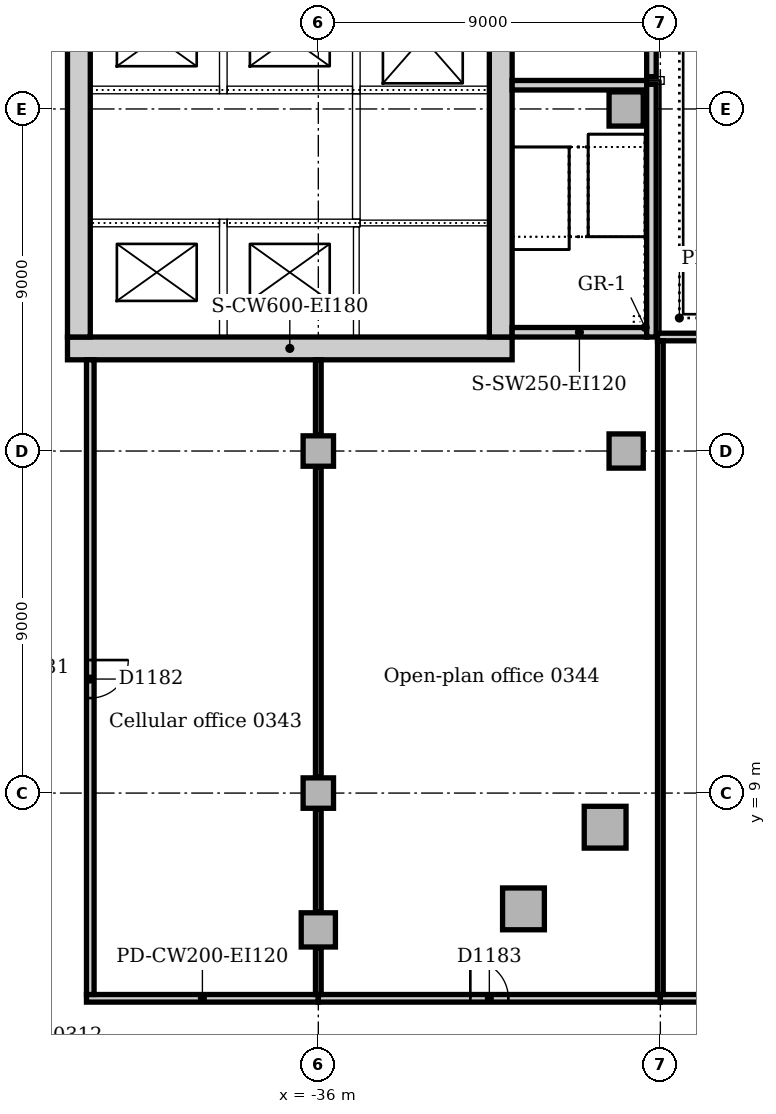
"""IFC4 building model, lengths in metres.
Left out: names, types, materials, properties, quantities, classifications, styles, units other than length and angle.
Written with IfcOpenShell. Run it as: python <this file> out.ifc"""

import sys

from ifc_helpers import new_model, si_unit, direction, frame, frame_2d, origin, origin_2d, place, context, subcontext, project, spatial, rectangle, extrude, element, fill, save


model = new_model("IFC4")
c1 = context("Model", 3, precision=1e-05, world=origin(), true_north=direction((0.0, 1.0)))
c2 = subcontext(c1, "Body", "Model", "MODEL_VIEW")
j1 = project(units=[si_unit("LENGTHUNIT", "METRE"), si_unit("PLANEANGLEUNIT", "RADIAN")], contexts=[c1])
p1 = place(None, origin())
s1 = spatial("IfcSite", under=j1, at=p1, CompositionType="ELEMENT")
p2 = place(p1, origin())
s2 = spatial("IfcBuilding", under=s1, at=p2, CompositionType="ELEMENT")
p3 = place(p2, frame((0.0, 0.0, 16.0)))
s3 = spatial("IfcBuildingStorey", under=s2, at=p3, CompositionType="ELEMENT", Elevation=16.0)
p4 = place(p3, frame((-42.6, 20.7, 0.0), z_axis=(0.0, 0.0, 1.0), x_axis=(1.0, 0.0, 0.0)))
e1 = element("IfcWall", 1, at=p4, inside=s3, PredefinedType="SOLIDWALL", context=c2, shape_type="SweptSolid", body=[
    extrude(rectangle(XDim=11.7, YDim=0.6, at=frame_2d((5.85, 0.0))), origin(), (0.0, 0.0, 1.0), 5.0),
])
p5 = place(p3, frame((-31.2, 21.0, 0.0), z_axis=(0.0, 0.0, 1.0), x_axis=(0.0, 1.0, 0.0)))
e2 = element("IfcWall", 2, at=p5, inside=s3, PredefinedType="SOLIDWALL", context=c2, shape_type="SweptSolid", body=[
    extrude(rectangle(XDim=9.5, YDim=0.6, at=frame_2d((4.75, 0.0))), origin(), (0.0, 0.0, 1.0), 5.0),
])
p6 = place(p5, frame((5.25, 0.0, 0.0)))
e3 = element("IfcOpeningElement", 3, at=p6, cuts=e2, PredefinedType="OPENING", context=c2, shape_type="SweptSolid", body=[
    extrude(rectangle(XDim=1.0, YDim=2.1, at=frame_2d((0.5, 1.05))), frame((0.0, 0.31, 0.0), z_axis=(0.0, -1.0, 0.0), x_axis=(1.0, 0.0, 0.0)), (0.0, 0.0, 1.0), 0.62),
])
p7 = place(p3, frame((-42.3, 30.5, 0.0), z_axis=(0.0, 0.0, 1.0), x_axis=(0.0, -1.0, 0.0)))
e4 = element("IfcWall", 4, at=p7, inside=s3, PredefinedType="SOLIDWALL", context=c2, shape_type="SweptSolid", body=[
    extrude(rectangle(XDim=9.5, YDim=0.6, at=frame_2d((4.75, 0.0))), origin(), (0.0, 0.0, 1.0), 5.0),
])
p8 = place(p7, frame((3.85, 0.0, 0.0)))
e5 = element("IfcOpeningElement", 5, at=p8, cuts=e4, PredefinedType="OPENING", context=c2, shape_type="SweptSolid", body=[
    extrude(rectangle(XDim=1.8, YDim=2.1, at=frame_2d((0.9, 1.05))), frame((0.0, 0.31, 0.0), z_axis=(0.0, -1.0, 0.0), x_axis=(1.0, 0.0, 0.0)), (0.0, 0.0, 1.0), 0.62),
])
p9 = place(p3, frame((-30.9, 21.125, 0.0), z_axis=(0.0, 0.0, 1.0), x_axis=(1.0, 0.0, 0.0)))
e6 = element("IfcWall", 6, at=p9, inside=s3, PredefinedType="SOLIDWALL", context=c2, shape_type="SweptSolid", body=[
    extrude(rectangle(XDim=3.54, YDim=0.25, at=frame_2d((1.77, 0.0))), origin(), (0.0, 0.0, 1.0), 5.0),
])
p10 = place(p3, frame((-27.36, 27.625, 0.0), z_axis=(0.0, 0.0, 1.0), x_axis=(-1.0, 0.0, 0.0)))
e7 = element("IfcWall", 7, at=p10, inside=s3, PredefinedType="SOLIDWALL", context=c2, shape_type="SweptSolid", body=[
    extrude(rectangle(XDim=3.54, YDim=0.25, at=frame_2d((1.77, 0.0))), origin(), (0.0, 0.0, 1.0), 5.0),
])
p11 = place(p10, frame((1.69, 0.0, 0.0)))
e8 = element("IfcOpeningElement", 8, at=p11, cuts=e7, PredefinedType="OPENING", context=c2, shape_type="SweptSolid", body=[
    extrude(rectangle(XDim=1.1, YDim=2.1, at=frame_2d((0.55, 1.05))), frame((0.0, 0.135, 0.0), z_axis=(0.0, -1.0, 0.0), x_axis=(1.0, 0.0, 0.0)), (0.0, 0.0, 1.0), 0.27),
])
p12 = place(p3, frame((-27.235, 21.0, 0.0), z_axis=(0.0, 0.0, 1.0), x_axis=(0.0, 1.0, 0.0)))
e9 = element("IfcWall", 9, at=p12, inside=s3, PredefinedType="SOLIDWALL", context=c2, shape_type="SweptSolid", body=[
    extrude(rectangle(XDim=6.65, YDim=0.25, at=frame_2d((3.325, 0.0))), origin(), (0.0, 0.0, 1.0), 5.0),
])
p13 = place(p3, frame((-27.235, 27.85, 0.0), z_axis=(0.0, 0.0, 1.0), x_axis=(0.0, 1.0, 0.0)))
e10 = element("IfcWall", 10, at=p13, inside=s3, PredefinedType="SOLIDWALL", context=c2, shape_type="SweptSolid", body=[
    extrude(rectangle(XDim=7.3, YDim=0.25, at=frame_2d((3.65, 0.0))), origin(), (0.0, 0.0, 1.0), 5.0),
])
for number, where, z_axis, x_axis in (
    (11, (-30.602, 5.953, 0.0), (0.0, 0.0, 1.0), (1.0, 0.0, 0.0)),
    (12, (-28.453, 8.102, 0.0), (0.0, 0.0, 1.0), (1.0, 0.0, 0.0)),
):
    element("IfcColumn", number, at=place(p3, frame(where, z_axis=z_axis, x_axis=x_axis)), inside=s3, PredefinedType="COLUMN", context=c2, shape_type="SweptSolid", body=[
        extrude(rectangle(XDim=1.1, YDim=1.1, at=origin_2d()), origin(), (0.0, 0.0, 1.0), 4.7),
    ])
for number, where, z_axis, x_axis in (
    (13, (-36.0, 5.4, 0.0), (0.0, 0.0, 1.0), (1.0, 0.0, 0.0)),
    (14, (-27.9, 18.0, 0.0), (0.0, 0.0, 1.0), (1.0, 0.0, 0.0)),
):
    element("IfcColumn", number, at=place(p3, frame(where, z_axis=z_axis, x_axis=x_axis)), inside=s3, PredefinedType="COLUMN", context=c2, shape_type="SweptSolid", body=[
        extrude(rectangle(XDim=0.9, YDim=0.9, at=origin_2d()), origin(), (0.0, 0.0, 1.0), 4.7),
    ])
p14 = place(p3, frame((-27.9, 27.0, 0.0), z_axis=(0.0, 0.0, 1.0), x_axis=(1.0, 0.0, 0.0)))
e15 = element("IfcColumn", 15, at=p14, inside=s3, PredefinedType="COLUMN", context=c2, shape_type="SweptSolid", body=[
    extrude(rectangle(XDim=0.9, YDim=0.9, at=origin_2d()), origin(), (0.0, 0.0, 1.0), 5.0),
])
for number, where, z_axis, x_axis in (
    (16, (-36.0, 9.0, 0.0), (0.0, 0.0, 1.0), (1.0, 0.0, 0.0)),
    (17, (-36.0, 18.0, 0.0), (0.0, 0.0, 1.0), (1.0, 0.0, 0.0)),
):
    element("IfcColumn", number, at=place(p3, frame(where, z_axis=z_axis, x_axis=x_axis)), inside=s3, PredefinedType="COLUMN", context=c2, shape_type="SweptSolid", body=[
        extrude(rectangle(XDim=0.8, YDim=0.8, at=origin_2d()), origin(), (0.0, 0.0, 1.0), 4.7),
    ])
p15 = place(p3, frame((-42.1, 3.6, 0.0), z_axis=(0.0, 0.0, 1.0), x_axis=(1.0, 0.0, 0.0)))
e18 = element("IfcWall", 18, at=p15, inside=s3, PredefinedType="PARTITIONING", context=c2, shape_type="SweptSolid", body=[
    extrude(rectangle(XDim=6.1, YDim=0.2, at=frame_2d((3.05, 0.0))), origin(), (0.0, 0.0, 1.0), 4.7),
])
p16 = place(p3, frame((-36.0, 3.6, 0.0), z_axis=(0.0, 0.0, 1.0), x_axis=(1.0, 0.0, 0.0)))
e19 = element("IfcWall", 19, at=p16, inside=s3, PredefinedType="PARTITIONING", context=c2, shape_type="SweptSolid", body=[
    extrude(rectangle(XDim=9.0, YDim=0.2, at=frame_2d((4.5, 0.0))), origin(), (0.0, 0.0, 1.0), 4.7),
])
p17 = place(p16, frame((4.0, 0.0, 0.0)))
e20 = element("IfcOpeningElement", 20, at=p17, cuts=e19, PredefinedType="OPENING", context=c2, shape_type="SweptSolid", body=[
    extrude(rectangle(XDim=1.0, YDim=2.1, at=frame_2d((0.5, 1.05))), frame((0.0, 0.11, 0.0), z_axis=(0.0, -1.0, 0.0), x_axis=(1.0, 0.0, 0.0)), (0.0, 0.0, 1.0), 0.22),
])
p18 = place(p3, frame((-42.0, 3.7, 0.0), z_axis=(0.0, 0.0, 1.0), x_axis=(0.0, 1.0, 0.0)))
e21 = element("IfcWall", 21, at=p18, inside=s3, PredefinedType="PARTITIONING", context=c2, shape_type="SweptSolid", body=[
    extrude(rectangle(XDim=16.7, YDim=0.2, at=frame_2d((8.35, 0.0))), origin(), (0.0, 0.0, 1.0), 4.7),
])
p19 = place(p18, frame((7.8, 0.0, 0.0)))
e22 = element("IfcOpeningElement", 22, at=p19, cuts=e21, PredefinedType="OPENING", context=c2, shape_type="SweptSolid", body=[
    extrude(rectangle(XDim=1.0, YDim=2.1, at=frame_2d((0.5, 1.05))), frame((0.0, 0.11, 0.0), z_axis=(0.0, -1.0, 0.0), x_axis=(1.0, 0.0, 0.0)), (0.0, 0.0, 1.0), 0.22),
])
p20 = place(p3, frame((-27.0, 3.6, 0.0), z_axis=(0.0, 0.0, 1.0), x_axis=(1.0, 0.0, 0.0)))
e23 = element("IfcWall", 23, at=p20, inside=s3, PredefinedType="PARTITIONING", context=c2, shape_type="SweptSolid", body=[
    extrude(rectangle(XDim=9.0, YDim=0.2, at=frame_2d((4.5, 0.0))), origin(), (0.0, 0.0, 1.0), 4.7),
])
p21 = place(p20, frame((4.0, 0.0, 0.0)))
e24 = element("IfcOpeningElement", 24, at=p21, cuts=e23, PredefinedType="OPENING", context=c2, shape_type="SweptSolid", body=[
    extrude(rectangle(XDim=1.0, YDim=2.1, at=frame_2d((0.5, 1.05))), frame((0.0, 0.11, 0.0), z_axis=(0.0, -1.0, 0.0), x_axis=(1.0, 0.0, 0.0)), (0.0, 0.0, 1.0), 0.22),
])
p22 = place(p3, frame((-27.075, 21.0, 0.0), z_axis=(0.0, 0.0, 1.0), x_axis=(1.0, 0.0, 0.0)))
e25 = element("IfcWall", 25, at=p22, inside=s3, PredefinedType="PARTITIONING", context=c2, shape_type="SweptSolid", body=[
    extrude(rectangle(XDim=9.075, YDim=0.2, at=frame_2d((4.537, 0.0))), origin(), (0.0, 0.0, 1.0), 4.7),
])
p23 = place(p3, frame((-27.0, 3.7, 0.0), z_axis=(0.0, 0.0, 1.0), x_axis=(0.0, 1.0, 0.0)))
e26 = element("IfcWall", 26, at=p23, inside=s3, PredefinedType="PARTITIONING", context=c2, shape_type="SweptSolid", body=[
    extrude(rectangle(XDim=17.2, YDim=0.15, at=frame_2d((8.6, 0.0))), origin(), (0.0, 0.0, 1.0), 4.7),
])
p24 = place(p3, frame((-36.0, 3.7, 0.0), z_axis=(0.0, 0.0, 1.0), x_axis=(0.0, 1.0, 0.0)))
e27 = element("IfcWall", 27, at=p24, inside=s3, PredefinedType="PARTITIONING", context=c2, shape_type="SweptSolid", body=[
    extrude(rectangle(XDim=1.23, YDim=0.15, at=frame_2d((0.615, 0.0))), origin(), (0.0, 0.0, 1.0), 4.7),
])
p25 = place(p3, frame((-36.0, 5.87, 0.0), z_axis=(0.0, 0.0, 1.0), x_axis=(0.0, 1.0, 0.0)))
e28 = element("IfcWall", 28, at=p25, inside=s3, PredefinedType="PARTITIONING", context=c2, shape_type="SweptSolid", body=[
    extrude(rectangle(XDim=2.71, YDim=0.15, at=frame_2d((1.355, 0.0))), origin(), (0.0, 0.0, 1.0), 4.7),
])
p26 = place(p3, frame((-36.0, 9.42, 0.0), z_axis=(0.0, 0.0, 1.0), x_axis=(0.0, 1.0, 0.0)))
e29 = element("IfcWall", 29, at=p26, inside=s3, PredefinedType="PARTITIONING", context=c2, shape_type="SweptSolid", body=[
    extrude(rectangle(XDim=8.16, YDim=0.15, at=frame_2d((4.08, 0.0))), origin(), (0.0, 0.0, 1.0), 4.7),
])
p27 = place(p3, frame((-36.0, 18.42, 0.0), z_axis=(0.0, 0.0, 1.0), x_axis=(0.0, 1.0, 0.0)))
e30 = element("IfcWall", 30, at=p27, inside=s3, PredefinedType="PARTITIONING", context=c2, shape_type="SweptSolid", body=[
    extrude(rectangle(XDim=1.98, YDim=0.15, at=frame_2d((0.99, 0.0))), origin(), (0.0, 0.0, 1.0), 4.7),
])
p28 = place(p3, frame((-38.5, 21.0, 0.0), z_axis=(0.0, 0.0, 1.0), x_axis=(0.0, 1.0, 0.0)))
e31 = element("IfcWall", 31, at=p28, inside=s3, PredefinedType="SOLIDWALL", context=c2, shape_type="SweptSolid", body=[
    extrude(rectangle(XDim=3.1, YDim=0.2, at=frame_2d((1.55, 0.0))), origin(), (0.0, 0.0, 1.0), 5.0),
])
p29 = place(p3, frame((-38.6, 24.0, 0.0), z_axis=(0.0, 0.0, 1.0), x_axis=(-1.0, 0.0, 0.0)))
e32 = element("IfcWall", 32, at=p29, inside=s3, PredefinedType="SOLIDWALL", context=c2, shape_type="SweptSolid", body=[
    extrude(rectangle(XDim=3.4, YDim=0.2, at=frame_2d((1.7, 0.0))), origin(), (0.0, 0.0, 1.0), 5.0),
])
p30 = place(p29, frame((0.8, 0.0, 0.0)))
e33 = element("IfcOpeningElement", 33, at=p30, cuts=e32, PredefinedType="OPENING", context=c2, shape_type="SweptSolid", body=[
    extrude(rectangle(XDim=1.1, YDim=2.1, at=frame_2d((0.55, 1.05))), frame((0.0, 0.11, 0.0), z_axis=(0.0, -1.0, 0.0), x_axis=(1.0, 0.0, 0.0)), (0.0, 0.0, 1.0), 0.22),
])
p31 = place(p3, frame((-34.9, 24.0, 0.0), z_axis=(0.0, 0.0, 1.0), x_axis=(-1.0, 0.0, 0.0)))
e34 = element("IfcWall", 34, at=p31, inside=s3, PredefinedType="SOLIDWALL", context=c2, shape_type="SweptSolid", body=[
    extrude(rectangle(XDim=3.5, YDim=0.2, at=frame_2d((1.75, 0.0))), origin(), (0.0, 0.0, 1.0), 5.0),
])
p32 = place(p31, frame((1.3, 0.0, 0.0)))
e35 = element("IfcOpeningElement", 35, at=p32, cuts=e34, PredefinedType="OPENING", context=c2, shape_type="SweptSolid", body=[
    extrude(rectangle(XDim=1.1, YDim=2.1, at=frame_2d((0.55, 1.05))), frame((0.0, 0.11, 0.0), z_axis=(0.0, -1.0, 0.0), x_axis=(1.0, 0.0, 0.0)), (0.0, 0.0, 1.0), 0.22),
])
p33 = place(p3, frame((-38.5, 27.4, 0.0), z_axis=(0.0, 0.0, 1.0), x_axis=(0.0, 1.0, 0.0)))
e36 = element("IfcWall", 36, at=p33, inside=s3, PredefinedType="SOLIDWALL", context=c2, shape_type="SweptSolid", body=[
    extrude(rectangle(XDim=2.85, YDim=0.2, at=frame_2d((1.425, 0.0))), origin(), (0.0, 0.0, 1.0), 5.0),
])
p34 = place(p3, frame((-42.0, 27.5, 0.0), z_axis=(0.0, 0.0, 1.0), x_axis=(1.0, 0.0, 0.0)))
e37 = element("IfcWall", 37, at=p34, inside=s3, PredefinedType="SOLIDWALL", context=c2, shape_type="SweptSolid", body=[
    extrude(rectangle(XDim=3.4, YDim=0.2, at=frame_2d((1.7, 0.0))), origin(), (0.0, 0.0, 1.0), 5.0),
])
p35 = place(p34, frame((1.5, 0.0, 0.0)))
e38 = element("IfcOpeningElement", 38, at=p35, cuts=e37, PredefinedType="OPENING", context=c2, shape_type="SweptSolid", body=[
    extrude(rectangle(XDim=1.1, YDim=2.1, at=frame_2d((0.55, 1.05))), frame((0.0, 0.11, 0.0), z_axis=(0.0, -1.0, 0.0), x_axis=(1.0, 0.0, 0.0)), (0.0, 0.0, 1.0), 0.22),
])
p36 = place(p3, frame((-35.0, 27.4, 0.0), z_axis=(0.0, 0.0, 1.0), x_axis=(0.0, 1.0, 0.0)))
e39 = element("IfcWall", 39, at=p36, inside=s3, PredefinedType="SOLIDWALL", context=c2, shape_type="SweptSolid", body=[
    extrude(rectangle(XDim=2.85, YDim=0.2, at=frame_2d((1.425, 0.0))), origin(), (0.0, 0.0, 1.0), 5.0),
])
p37 = place(p3, frame((-38.4, 27.5, 0.0), z_axis=(0.0, 0.0, 1.0), x_axis=(1.0, 0.0, 0.0)))
e40 = element("IfcWall", 40, at=p37, inside=s3, PredefinedType="SOLIDWALL", context=c2, shape_type="SweptSolid", body=[
    extrude(rectangle(XDim=3.3, YDim=0.2, at=frame_2d((1.65, 0.0))), origin(), (0.0, 0.0, 1.0), 5.0),
])
p38 = place(p37, frame((1.1, 0.0, 0.0)))
e41 = element("IfcOpeningElement", 41, at=p38, cuts=e40, PredefinedType="OPENING", context=c2, shape_type="SweptSolid", body=[
    extrude(rectangle(XDim=1.1, YDim=2.1, at=frame_2d((0.55, 1.05))), frame((0.0, 0.11, 0.0), z_axis=(0.0, -1.0, 0.0), x_axis=(1.0, 0.0, 0.0)), (0.0, 0.0, 1.0), 0.22),
])
p39 = place(p3, frame((-34.9, 27.5, 0.0), z_axis=(0.0, 0.0, 1.0), x_axis=(1.0, 0.0, 0.0)))
e42 = element("IfcWall", 42, at=p39, inside=s3, PredefinedType="SOLIDWALL", context=c2, shape_type="SweptSolid", body=[
    extrude(rectangle(XDim=3.4, YDim=0.2, at=frame_2d((1.7, 0.0))), origin(), (0.0, 0.0, 1.0), 5.0),
])
p40 = place(p39, frame((1.1, 0.0, 0.0)))
e43 = element("IfcOpeningElement", 43, at=p40, cuts=e42, PredefinedType="OPENING", context=c2, shape_type="SweptSolid", body=[
    extrude(rectangle(XDim=1.1, YDim=2.1, at=frame_2d((0.55, 1.05))), frame((0.0, 0.11, 0.0), z_axis=(0.0, -1.0, 0.0), x_axis=(1.0, 0.0, 0.0)), (0.0, 0.0, 1.0), 0.22),
])
p41 = place(p3, frame((-35.0, 24.1, 0.0), z_axis=(0.0, 0.0, 1.0), x_axis=(0.0, 1.0, 0.0)))
e44 = element("IfcWall", 44, at=p41, inside=s3, PredefinedType="SOLIDWALL", context=c2, shape_type="SweptSolid", body=[
    extrude(rectangle(XDim=3.3, YDim=0.2, at=frame_2d((1.65, 0.0))), origin(), (0.0, 0.0, 1.0), 5.0),
])
p42 = place(p41, frame((1.15, 0.0, 0.0)))
e45 = element("IfcOpeningElement", 45, at=p42, cuts=e44, PredefinedType="OPENING", context=c2, shape_type="SweptSolid", body=[
    extrude(rectangle(XDim=1.0, YDim=2.1, at=frame_2d((0.5, 1.05))), frame((0.0, 0.11, 0.0), z_axis=(0.0, -1.0, 0.0), x_axis=(1.0, 0.0, 0.0)), (0.0, 0.0, 1.0), 0.22),
])
p43 = place(p3, frame((-27.36, 27.75, 0.0), z_axis=(0.0, 0.0, 1.0), x_axis=(1.0, 0.0, 0.0)))
e46 = element("IfcWall", 46, at=p43, inside=s3, PredefinedType="SOLIDWALL", context=c2, shape_type="SweptSolid", body=[
    extrude(rectangle(XDim=0.46, YDim=0.2, at=frame_2d((0.23, 0.0))), origin(), (0.0, 0.0, 1.0), 5.0),
])
p44 = place(p3, frame((-35.0, 21.0, 0.0), z_axis=(0.0, 0.0, 1.0), x_axis=(0.0, 1.0, 0.0)))
e47 = element("IfcWall", 47, at=p44, inside=s3, PredefinedType="SOLIDWALL", context=c2, shape_type="SweptSolid", body=[
    extrude(rectangle(XDim=2.9, YDim=0.15, at=frame_2d((1.45, 0.0))), origin(), (0.0, 0.0, 1.0), 5.0),
])
p45 = place(p3, frame((-31.5, 24.0, 0.0), z_axis=(0.0, 0.0, 1.0), x_axis=(-1.0, 0.0, 0.0)))
e48 = element("IfcWall", 48, at=p45, inside=s3, PredefinedType="SOLIDWALL", context=c2, shape_type="SweptSolid", body=[
    extrude(rectangle(XDim=3.4, YDim=0.15, at=frame_2d((1.7, 0.0))), origin(), (0.0, 0.0, 1.0), 5.0),
])
p46 = place(p19, frame((1.0, 0.0, 0.0), z_axis=(0.0, 0.0, 1.0), x_axis=(-1.0, 0.0, 0.0)))
e49 = element("IfcDoor", 49, at=p46, inside=s3, OperationType="SINGLE_SWING_LEFT", PredefinedType="DOOR", context=c2, shape_type="SweptSolid", body=[
    extrude(rectangle(XDim=1.0, YDim=2.1, at=frame_2d((0.5, 1.05))), frame((0.0, 0.025, 0.0), z_axis=(0.0, -1.0, 0.0), x_axis=(1.0, 0.0, 0.0)), (0.0, 0.0, 1.0), 0.05),
])
fill(e22, e49)
p47 = place(p17, origin())
e50 = element("IfcDoor", 50, at=p47, inside=s3, OperationType="SINGLE_SWING_LEFT", PredefinedType="DOOR", context=c2, shape_type="SweptSolid", body=[
    extrude(rectangle(XDim=1.0, YDim=2.1, at=frame_2d((0.5, 1.05))), frame((0.0, 0.025, 0.0), z_axis=(0.0, -1.0, 0.0), x_axis=(1.0, 0.0, 0.0)), (0.0, 0.0, 1.0), 0.05),
])
fill(e20, e50)
p48 = place(p30, origin())
e51 = element("IfcDoor", 51, at=p48, inside=s3, OperationType="SLIDING_TO_LEFT", PredefinedType="DOOR", context=c2, shape_type="SweptSolid", body=[
    extrude(rectangle(XDim=1.1, YDim=2.1, at=frame_2d((0.55, 1.05))), frame((0.0, 0.025, 0.0), z_axis=(0.0, -1.0, 0.0), x_axis=(1.0, 0.0, 0.0)), (0.0, 0.0, 1.0), 0.05),
])
fill(e33, e51)
p49 = place(p32, origin())
e52 = element("IfcDoor", 52, at=p49, inside=s3, OperationType="SLIDING_TO_LEFT", PredefinedType="DOOR", context=c2, shape_type="SweptSolid", body=[
    extrude(rectangle(XDim=1.1, YDim=2.1, at=frame_2d((0.55, 1.05))), frame((0.0, 0.025, 0.0), z_axis=(0.0, -1.0, 0.0), x_axis=(1.0, 0.0, 0.0)), (0.0, 0.0, 1.0), 0.05),
])
fill(e35, e52)
p50 = place(p35, origin())
e53 = element("IfcDoor", 53, at=p50, inside=s3, OperationType="SLIDING_TO_LEFT", PredefinedType="DOOR", context=c2, shape_type="SweptSolid", body=[
    extrude(rectangle(XDim=1.1, YDim=2.1, at=frame_2d((0.55, 1.05))), frame((0.0, 0.025, 0.0), z_axis=(0.0, -1.0, 0.0), x_axis=(1.0, 0.0, 0.0)), (0.0, 0.0, 1.0), 0.05),
])
fill(e38, e53)
p51 = place(p38, origin())
e54 = element("IfcDoor", 54, at=p51, inside=s3, OperationType="SLIDING_TO_LEFT", PredefinedType="DOOR", context=c2, shape_type="SweptSolid", body=[
    extrude(rectangle(XDim=1.1, YDim=2.1, at=frame_2d((0.55, 1.05))), frame((0.0, 0.025, 0.0), z_axis=(0.0, -1.0, 0.0), x_axis=(1.0, 0.0, 0.0)), (0.0, 0.0, 1.0), 0.05),
])
fill(e41, e54)
p52 = place(p40, origin())
e55 = element("IfcDoor", 55, at=p52, inside=s3, OperationType="SLIDING_TO_LEFT", PredefinedType="DOOR", context=c2, shape_type="SweptSolid", body=[
    extrude(rectangle(XDim=1.1, YDim=2.1, at=frame_2d((0.55, 1.05))), frame((0.0, 0.025, 0.0), z_axis=(0.0, -1.0, 0.0), x_axis=(1.0, 0.0, 0.0)), (0.0, 0.0, 1.0), 0.05),
])
fill(e43, e55)
p53 = place(p42, origin())
e56 = element("IfcDoor", 56, at=p53, inside=s3, OperationType="SINGLE_SWING_RIGHT", PredefinedType="DOOR", context=c2, shape_type="SweptSolid", body=[
    extrude(rectangle(XDim=1.0, YDim=2.1, at=frame_2d((0.5, 1.05))), frame((0.0, 0.025, 0.0), z_axis=(0.0, -1.0, 0.0), x_axis=(1.0, 0.0, 0.0)), (0.0, 0.0, 1.0), 0.05),
])
fill(e45, e56)
p54 = place(p6, frame((1.0, 0.0, 0.0), z_axis=(0.0, 0.0, 1.0), x_axis=(-1.0, 0.0, 0.0)))
e57 = element("IfcDoor", 57, at=p54, inside=s3, OperationType="SINGLE_SWING_LEFT", PredefinedType="DOOR", context=c2, shape_type="SweptSolid", body=[
    extrude(rectangle(XDim=1.0, YDim=2.1, at=frame_2d((0.5, 1.05))), frame((0.0, 0.025, 0.0), z_axis=(0.0, -1.0, 0.0), x_axis=(1.0, 0.0, 0.0)), (0.0, 0.0, 1.0), 0.05),
])
fill(e3, e57)
p55 = place(p11, origin())
e58 = element("IfcDoor", 58, at=p55, inside=s3, OperationType="SINGLE_SWING_LEFT", PredefinedType="DOOR", context=c2, shape_type="SweptSolid", body=[
    extrude(rectangle(XDim=1.1, YDim=2.1, at=frame_2d((0.55, 1.05))), frame((0.0, 0.025, 0.0), z_axis=(0.0, -1.0, 0.0), x_axis=(1.0, 0.0, 0.0)), (0.0, 0.0, 1.0), 0.05),
])
fill(e8, e58)
p56 = place(p8, origin())
e59 = element("IfcDoor", 59, at=p56, inside=s3, OperationType="DOUBLE_DOOR_SINGLE_SWING", PredefinedType="DOOR", context=c2, shape_type="SweptSolid", body=[
    extrude(rectangle(XDim=1.8, YDim=2.1, at=frame_2d((0.9, 1.05))), frame((0.0, 0.025, 0.0), z_axis=(0.0, -1.0, 0.0), x_axis=(1.0, 0.0, 0.0)), (0.0, 0.0, 1.0), 0.05),
])
fill(e5, e59)
save(model, sys.argv[1])
